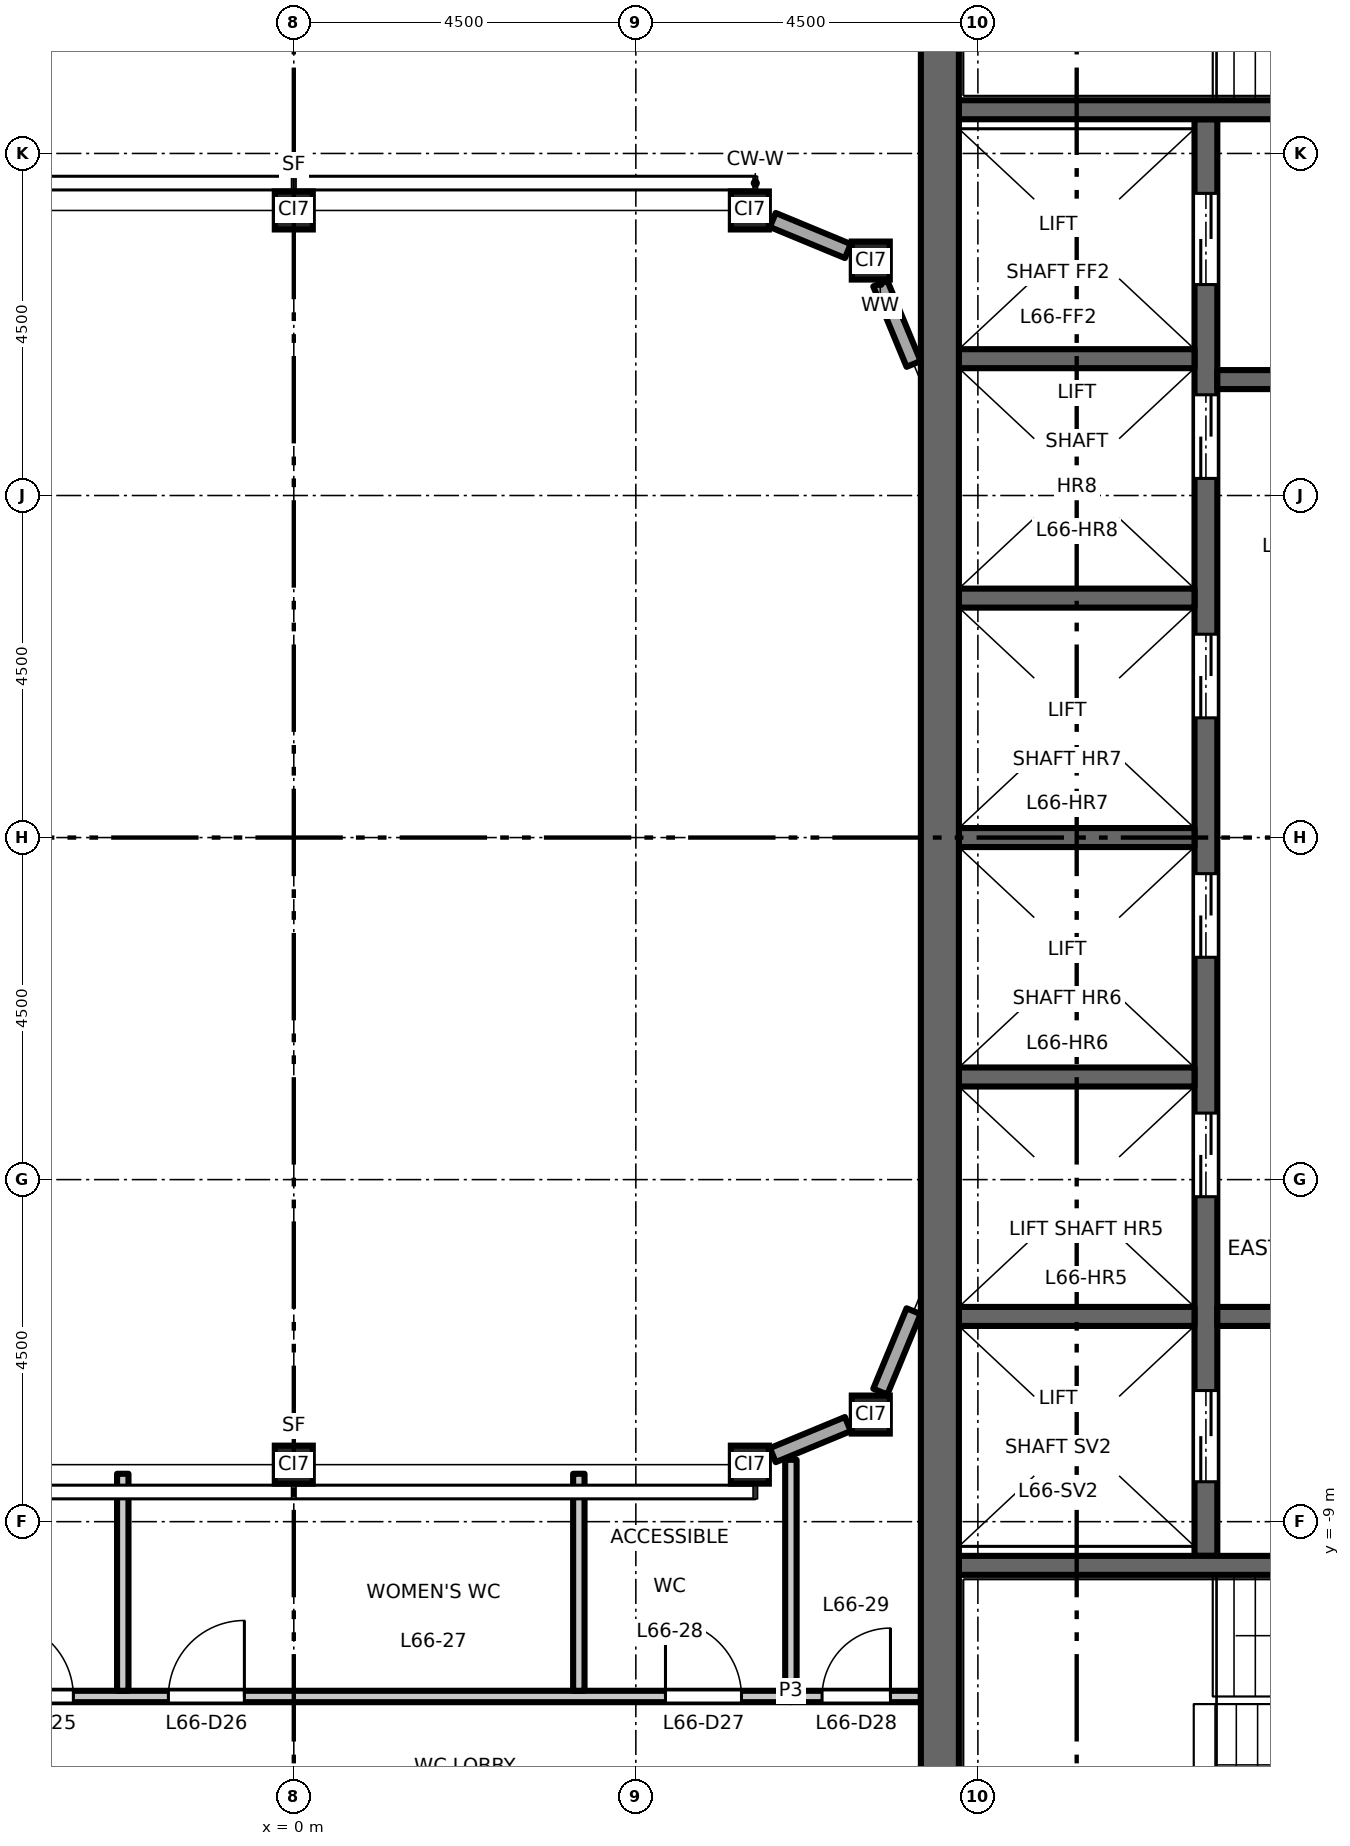
"""IFC4 building model, lengths in metres.
Left out: names, types, materials, properties, quantities, classifications, styles, units other than length and angle.
Written with IfcOpenShell. Run it as: python <this file> out.ifc"""

import sys

from ifc_helpers import new_model, si_unit, direction, frame, frame_2d, origin, origin_2d, place, context, subcontext, project, spatial, rectangle, hollow_rectangle, extrude, element, fill, save


model = new_model("IFC4")
c1 = context("Model", 3, precision=1e-05, world=origin(), true_north=direction((0.0, 1.0)))
c2 = subcontext(c1, "Body", "Model", "MODEL_VIEW")
j1 = project(units=[si_unit("LENGTHUNIT", "METRE"), si_unit("PLANEANGLEUNIT", "RADIAN")], contexts=[c1])
p1 = place(None, origin())
s1 = spatial("IfcSite", under=j1, at=p1, CompositionType="ELEMENT")
p2 = place(p1, origin())
s2 = spatial("IfcBuilding", under=s1, at=p2, CompositionType="ELEMENT")
p3 = place(p2, frame((0.0, 0.0, 307.7)))
s3 = spatial("IfcBuildingStorey", under=s2, at=p3, CompositionType="ELEMENT", Elevation=307.7)
for number, where, z_axis, x_axis in (
    (1, (0.0, -8.25, 0.0), (0.0, 0.0, 1.0), (1.0, 0.0, 0.0)),
    (2, (6.0, -8.25, 0.0), (0.0, 0.0, 1.0), (1.0, 0.0, 0.0)),
    (3, (7.591, -7.591, 0.0), (0.0, 0.0, 1.0), (1.0, 0.0, 0.0)),
    (4, (0.0, 8.25, 0.0), (0.0, 0.0, 1.0), (1.0, 0.0, 0.0)),
    (5, (6.0, 8.25, 0.0), (0.0, 0.0, 1.0), (1.0, 0.0, 0.0)),
    (6, (7.591, 7.591, 0.0), (0.0, 0.0, 1.0), (1.0, 0.0, 0.0)),
):
    element("IfcColumn", number, at=place(p3, frame(where, z_axis=z_axis, x_axis=x_axis)), inside=s3, PredefinedType="COLUMN", context=c2, shape_type="SweptSolid", body=[
        extrude(hollow_rectangle(XDim=0.5, YDim=0.5, WallThickness=0.025, at=origin_2d()), origin(), (0.0, 0.0, 1.0), 4.5),
    ])
p4 = place(p3, frame((12.0, -9.45, 0.0), z_axis=(0.0, 0.0, 1.0), x_axis=(0.0, 1.0, 0.0)))
e7 = element("IfcWall", 7, at=p4, inside=s3, PredefinedType="SHEAR", context=c2, shape_type="SweptSolid", body=[
    extrude(rectangle(XDim=18.9, YDim=0.3, at=frame_2d((9.45, 0.0))), origin(), (0.0, 0.0, 1.0), 4.35),
])
p5 = place(p4, frame((4.725, 0.0, 0.0)))
e8 = element("IfcOpeningElement", 8, at=p5, cuts=e7, PredefinedType="OPENING", context=c2, shape_type="SweptSolid", body=[
    extrude(rectangle(XDim=1.1, YDim=2.1, at=frame_2d((0.55, 1.05))), frame((0.0, 0.16, 0.0), z_axis=(0.0, -1.0, 0.0), x_axis=(1.0, 0.0, 0.0)), (0.0, 0.0, 1.0), 0.32),
])
p6 = place(p4, frame((7.875, 0.0, 0.0)))
e9 = element("IfcOpeningElement", 9, at=p6, cuts=e7, PredefinedType="OPENING", context=c2, shape_type="SweptSolid", body=[
    extrude(rectangle(XDim=1.1, YDim=2.1, at=frame_2d((0.55, 1.05))), frame((0.0, 0.16, 0.0), z_axis=(0.0, -1.0, 0.0), x_axis=(1.0, 0.0, 0.0)), (0.0, 0.0, 1.0), 0.32),
])
p7 = place(p4, frame((11.025, 0.0, 0.0)))
e10 = element("IfcOpeningElement", 10, at=p7, cuts=e7, PredefinedType="OPENING", context=c2, shape_type="SweptSolid", body=[
    extrude(rectangle(XDim=1.1, YDim=2.1, at=frame_2d((0.55, 1.05))), frame((0.0, 0.16, 0.0), z_axis=(0.0, -1.0, 0.0), x_axis=(1.0, 0.0, 0.0)), (0.0, 0.0, 1.0), 0.32),
])
p8 = place(p4, frame((14.175, 0.0, 0.0)))
e11 = element("IfcOpeningElement", 11, at=p8, cuts=e7, PredefinedType="OPENING", context=c2, shape_type="SweptSolid", body=[
    extrude(rectangle(XDim=1.1, YDim=2.1, at=frame_2d((0.55, 1.05))), frame((0.0, 0.16, 0.0), z_axis=(0.0, -1.0, 0.0), x_axis=(1.0, 0.0, 0.0)), (0.0, 0.0, 1.0), 0.32),
])
p9 = place(p4, frame((16.725, 0.0, 0.0)))
e12 = element("IfcOpeningElement", 12, at=p9, cuts=e7, PredefinedType="OPENING", context=c2, shape_type="SweptSolid", body=[
    extrude(rectangle(XDim=1.2, YDim=2.1, at=frame_2d((0.6, 1.05))), frame((0.0, 0.16, 0.0), z_axis=(0.0, -1.0, 0.0), x_axis=(1.0, 0.0, 0.0)), (0.0, 0.0, 1.0), 0.32),
])
p10 = place(p4, frame((0.975, 0.0, 0.0)))
e13 = element("IfcOpeningElement", 13, at=p10, cuts=e7, PredefinedType="OPENING", context=c2, shape_type="SweptSolid", body=[
    extrude(rectangle(XDim=1.2, YDim=2.1, at=frame_2d((0.6, 1.05))), frame((0.0, 0.16, 0.0), z_axis=(0.0, -1.0, 0.0), x_axis=(1.0, 0.0, 0.0)), (0.0, 0.0, 1.0), 0.32),
])
p11 = place(p3, frame((12.15, 6.025, 0.0), z_axis=(0.0, 0.0, 1.0), x_axis=(1.0, 0.0, 0.0)))
e14 = element("IfcWall", 14, at=p11, inside=s3, PredefinedType="SHEAR", context=c2, shape_type="SweptSolid", body=[
    extrude(rectangle(XDim=4.6, YDim=0.25, at=frame_2d((2.3, 0.0))), origin(), (0.0, 0.0, 1.0), 4.35),
])
p12 = place(p11, frame((1.8, 0.0, 0.0)))
e15 = element("IfcOpeningElement", 15, at=p12, cuts=e14, PredefinedType="OPENING", context=c2, shape_type="SweptSolid", body=[
    extrude(rectangle(XDim=1.0, YDim=2.1, at=frame_2d((0.5, 1.05))), frame((0.0, 0.135, 0.0), z_axis=(0.0, -1.0, 0.0), x_axis=(1.0, 0.0, 0.0)), (0.0, 0.0, 1.0), 0.27),
])
p13 = place(p3, frame((12.15, -6.3, 0.0), z_axis=(0.0, 0.0, 1.0), x_axis=(1.0, 0.0, 0.0)))
e16 = element("IfcWall", 16, at=p13, inside=s3, PredefinedType="SHEAR", context=c2, shape_type="SweptSolid", body=[
    extrude(rectangle(XDim=4.6, YDim=0.25, at=frame_2d((2.3, 0.0))), origin(), (0.0, 0.0, 1.0), 4.35),
])
p14 = place(p13, frame((1.8, 0.0, 0.0)))
e17 = element("IfcOpeningElement", 17, at=p14, cuts=e16, PredefinedType="OPENING", context=c2, shape_type="SweptSolid", body=[
    extrude(rectangle(XDim=1.0, YDim=2.1, at=frame_2d((0.5, 1.05))), frame((0.0, 0.135, 0.0), z_axis=(0.0, -1.0, 0.0), x_axis=(1.0, 0.0, 0.0)), (0.0, 0.0, 1.0), 0.27),
])
for number, where, z_axis, x_axis in (
    (18, (8.75, 0.0, 0.0), (0.0, 0.0, 1.0), (1.0, 0.0, 0.0)),
    (19, (8.75, 3.15, 0.0), (0.0, 0.0, 1.0), (1.0, 0.0, 0.0)),
    (20, (8.75, 6.3, 0.0), (0.0, 0.0, 1.0), (1.0, 0.0, 0.0)),
    (21, (8.75, -3.15, 0.0), (0.0, 0.0, 1.0), (1.0, 0.0, 0.0)),
    (22, (8.75, -6.3, 0.0), (0.0, 0.0, 1.0), (1.0, 0.0, 0.0)),
):
    element("IfcWall", number, at=place(p3, frame(where, z_axis=z_axis, x_axis=x_axis)), inside=s3, PredefinedType="SHEAR", context=c2, shape_type="SweptSolid", body=[
        extrude(rectangle(XDim=3.1, YDim=0.25, at=frame_2d((1.55, 0.0))), origin(), (0.0, 0.0, 1.0), 4.35),
    ])
p15 = place(p3, frame((8.75, 9.575, 0.0), z_axis=(0.0, 0.0, 1.0), x_axis=(1.0, 0.0, 0.0)))
e23 = element("IfcWall", 23, at=p15, inside=s3, PredefinedType="SHEAR", context=c2, shape_type="SweptSolid", body=[
    extrude(rectangle(XDim=8.0, YDim=0.25, at=frame_2d((4.0, 0.0))), origin(), (0.0, 0.0, 1.0), 4.35),
])
p16 = place(p15, frame((6.65, 0.0, 0.0)))
e24 = element("IfcOpeningElement", 24, at=p16, cuts=e23, PredefinedType="OPENING", context=c2, shape_type="SweptSolid", body=[
    extrude(rectangle(XDim=1.1, YDim=2.1, at=frame_2d((0.55, 1.05))), frame((0.0, 0.135, 0.0), z_axis=(0.0, -1.0, 0.0), x_axis=(1.0, 0.0, 0.0)), (0.0, 0.0, 1.0), 0.27),
])
p17 = place(p3, frame((8.75, -9.575, 0.0), z_axis=(0.0, 0.0, 1.0), x_axis=(1.0, 0.0, 0.0)))
e25 = element("IfcWall", 25, at=p17, inside=s3, PredefinedType="SHEAR", context=c2, shape_type="SweptSolid", body=[
    extrude(rectangle(XDim=8.0, YDim=0.25, at=frame_2d((4.0, 0.0))), origin(), (0.0, 0.0, 1.0), 4.35),
])
p18 = place(p17, frame((6.65, 0.0, 0.0)))
e26 = element("IfcOpeningElement", 26, at=p18, cuts=e25, PredefinedType="OPENING", context=c2, shape_type="SweptSolid", body=[
    extrude(rectangle(XDim=1.1, YDim=2.1, at=frame_2d((0.55, 1.05))), frame((0.0, 0.135, 0.0), z_axis=(0.0, -1.0, 0.0), x_axis=(1.0, 0.0, 0.0)), (0.0, 0.0, 1.0), 0.27),
])
p19 = place(p3, frame((8.5, -13.0, 0.0), z_axis=(0.0, 0.0, 1.0), x_axis=(0.0, 1.0, 0.0)))
e27 = element("IfcWall", 27, at=p19, inside=s3, PredefinedType="SHEAR", context=c2, shape_type="SweptSolid", body=[
    extrude(rectangle(XDim=26.0, YDim=0.5, at=frame_2d((13.0, 0.0))), origin(), (0.0, 0.0, 1.0), 4.35),
])
p20 = place(p3, frame((6.302, -8.125, 0.0), z_axis=(0.0, 0.0, 1.0), x_axis=(0.923919409248, 0.382587147216, 0.0)))
e28 = element("IfcWall", 28, at=p20, inside=s3, PredefinedType="STANDARD", context=c2, shape_type="SweptSolid", body=[
    extrude(rectangle(XDim=1.069, YDim=0.2, at=frame_2d((0.534, 0.0))), origin(), (0.0, 0.0, 1.0), 4.01),
])
for number, where, z_axis, x_axis in (
    (29, (7.716, -7.289, 0.0), (0.0, 0.0, 1.0), (0.383, 0.924, 0.0)),
    (30, (8.154, 6.231, 0.0), (0.0, 0.0, 1.0), (-0.383, 0.924, 0.0)),
):
    element("IfcWall", number, at=place(p3, frame(where, z_axis=z_axis, x_axis=x_axis)), inside=s3, PredefinedType="STANDARD", context=c2, shape_type="SweptSolid", body=[
        extrude(rectangle(XDim=1.146, YDim=0.2, at=frame_2d((0.573, 0.0))), origin(), (0.0, 0.0, 1.0), 4.01),
    ])
p21 = place(p3, frame((7.289, 7.716, 0.0), z_axis=(0.0, 0.0, 1.0), x_axis=(-0.923919409248, 0.382587147216, 0.0)))
e31 = element("IfcWall", 31, at=p21, inside=s3, PredefinedType="STANDARD", context=c2, shape_type="SweptSolid", body=[
    extrude(rectangle(XDim=1.069, YDim=0.2, at=frame_2d((0.534, 0.0))), origin(), (0.0, 0.0, 1.0), 4.01),
])
p22 = place(p3, frame((-8.25, -11.3, 0.0), z_axis=(0.0, 0.0, 1.0), x_axis=(1.0, 0.0, 0.0)))
e32 = element("IfcWall", 32, at=p22, inside=s3, PredefinedType="PARTITIONING", context=c2, shape_type="SweptSolid", body=[
    extrude(rectangle(XDim=14.79, YDim=0.15, at=frame_2d((7.395, 0.0))), origin(), (0.0, 0.0, 1.0), 4.35),
])
p23 = place(p22, frame((4.35, 0.0, 0.0)))
e33 = element("IfcOpeningElement", 33, at=p23, cuts=e32, PredefinedType="OPENING", context=c2, shape_type="SweptSolid", body=[
    extrude(rectangle(XDim=1.0, YDim=2.1, at=frame_2d((0.5, 1.05))), frame((0.0, 0.085, 0.0), z_axis=(0.0, -1.0, 0.0), x_axis=(1.0, 0.0, 0.0)), (0.0, 0.0, 1.0), 0.17),
])
p24 = place(p22, frame((6.6, 0.0, 0.0)))
e34 = element("IfcOpeningElement", 34, at=p24, cuts=e32, PredefinedType="OPENING", context=c2, shape_type="SweptSolid", body=[
    extrude(rectangle(XDim=1.0, YDim=2.1, at=frame_2d((0.5, 1.05))), frame((0.0, 0.085, 0.0), z_axis=(0.0, -1.0, 0.0), x_axis=(1.0, 0.0, 0.0)), (0.0, 0.0, 1.0), 0.17),
])
p25 = place(p22, frame((13.14, 0.0, 0.0)))
e35 = element("IfcOpeningElement", 35, at=p25, cuts=e32, PredefinedType="OPENING", context=c2, shape_type="SweptSolid", body=[
    extrude(rectangle(XDim=1.0, YDim=2.1, at=frame_2d((0.5, 1.05))), frame((0.0, 0.085, 0.0), z_axis=(0.0, -1.0, 0.0), x_axis=(1.0, 0.0, 0.0)), (0.0, 0.0, 1.0), 0.17),
])
p26 = place(p3, frame((6.54, -11.3, 0.0), z_axis=(0.0, 0.0, 1.0), x_axis=(1.0, 0.0, 0.0)))
e36 = element("IfcWall", 36, at=p26, inside=s3, PredefinedType="PARTITIONING", context=c2, shape_type="SweptSolid", body=[
    extrude(rectangle(XDim=1.71, YDim=0.15, at=frame_2d((0.855, 0.0))), origin(), (0.0, 0.0, 1.0), 4.35),
])
p27 = place(p26, frame((0.41, 0.0, 0.0)))
e37 = element("IfcOpeningElement", 37, at=p27, cuts=e36, PredefinedType="OPENING", context=c2, shape_type="SweptSolid", body=[
    extrude(rectangle(XDim=0.9, YDim=2.1, at=frame_2d((0.45, 1.05))), frame((0.0, 0.085, 0.0), z_axis=(0.0, -1.0, 0.0), x_axis=(1.0, 0.0, 0.0)), (0.0, 0.0, 1.0), 0.17),
])
for number, where, z_axis, x_axis in (
    (38, (-2.25, -11.225, 0.0), (0.0, 0.0, 1.0), (0.0, 1.0, 0.0)),
    (39, (3.75, -11.225, 0.0), (0.0, 0.0, 1.0), (0.0, 1.0, 0.0)),
):
    element("IfcWall", number, at=place(p3, frame(where, z_axis=z_axis, x_axis=x_axis)), inside=s3, PredefinedType="PARTITIONING", context=c2, shape_type="SweptSolid", body=[
        extrude(rectangle(XDim=2.855, YDim=0.15, at=frame_2d((1.427, 0.0))), origin(), (0.0, 0.0, 1.0), 4.35),
    ])
p28 = place(p3, frame((6.54, -11.225, 0.0), z_axis=(0.0, 0.0, 1.0), x_axis=(0.0, 1.0, 0.0)))
e40 = element("IfcWall", 40, at=p28, inside=s3, PredefinedType="PARTITIONING", context=c2, shape_type="SweptSolid", body=[
    extrude(rectangle(XDim=3.039, YDim=0.15, at=frame_2d((1.52, 0.0))), origin(), (0.0, 0.0, 1.0), 4.35),
])
p29 = place(p5, origin())
e41 = element("IfcDoor", 41, at=p29, inside=s3, OperationType="DOUBLE_DOOR_SLIDING", PredefinedType="DOOR", context=c2, shape_type="SweptSolid", body=[
    extrude(rectangle(XDim=1.1, YDim=2.1, at=frame_2d((0.55, 1.05))), frame((0.0, 0.025, 0.0), z_axis=(0.0, -1.0, 0.0), x_axis=(1.0, 0.0, 0.0)), (0.0, 0.0, 1.0), 0.05),
])
fill(e8, e41)
p30 = place(p6, origin())
e42 = element("IfcDoor", 42, at=p30, inside=s3, OperationType="DOUBLE_DOOR_SLIDING", PredefinedType="DOOR", context=c2, shape_type="SweptSolid", body=[
    extrude(rectangle(XDim=1.1, YDim=2.1, at=frame_2d((0.55, 1.05))), frame((0.0, 0.025, 0.0), z_axis=(0.0, -1.0, 0.0), x_axis=(1.0, 0.0, 0.0)), (0.0, 0.0, 1.0), 0.05),
])
fill(e9, e42)
p31 = place(p7, origin())
e43 = element("IfcDoor", 43, at=p31, inside=s3, OperationType="DOUBLE_DOOR_SLIDING", PredefinedType="DOOR", context=c2, shape_type="SweptSolid", body=[
    extrude(rectangle(XDim=1.1, YDim=2.1, at=frame_2d((0.55, 1.05))), frame((0.0, 0.025, 0.0), z_axis=(0.0, -1.0, 0.0), x_axis=(1.0, 0.0, 0.0)), (0.0, 0.0, 1.0), 0.05),
])
fill(e10, e43)
p32 = place(p8, origin())
e44 = element("IfcDoor", 44, at=p32, inside=s3, OperationType="DOUBLE_DOOR_SLIDING", PredefinedType="DOOR", context=c2, shape_type="SweptSolid", body=[
    extrude(rectangle(XDim=1.1, YDim=2.1, at=frame_2d((0.55, 1.05))), frame((0.0, 0.025, 0.0), z_axis=(0.0, -1.0, 0.0), x_axis=(1.0, 0.0, 0.0)), (0.0, 0.0, 1.0), 0.05),
])
fill(e11, e44)
p33 = place(p9, origin())
e45 = element("IfcDoor", 45, at=p33, inside=s3, OperationType="DOUBLE_DOOR_SLIDING", PredefinedType="DOOR", context=c2, shape_type="SweptSolid", body=[
    extrude(rectangle(XDim=1.2, YDim=2.1, at=frame_2d((0.6, 1.05))), frame((0.0, 0.025, 0.0), z_axis=(0.0, -1.0, 0.0), x_axis=(1.0, 0.0, 0.0)), (0.0, 0.0, 1.0), 0.05),
])
fill(e12, e45)
p34 = place(p10, origin())
e46 = element("IfcDoor", 46, at=p34, inside=s3, OperationType="DOUBLE_DOOR_SLIDING", PredefinedType="DOOR", context=c2, shape_type="SweptSolid", body=[
    extrude(rectangle(XDim=1.2, YDim=2.1, at=frame_2d((0.6, 1.05))), frame((0.0, 0.025, 0.0), z_axis=(0.0, -1.0, 0.0), x_axis=(1.0, 0.0, 0.0)), (0.0, 0.0, 1.0), 0.05),
])
fill(e13, e46)
p35 = place(p23, origin())
e47 = element("IfcDoor", 47, at=p35, inside=s3, OperationType="SINGLE_SWING_LEFT", PredefinedType="DOOR", context=c2, shape_type="SweptSolid", body=[
    extrude(rectangle(XDim=1.0, YDim=2.1, at=frame_2d((0.5, 1.05))), frame((0.0, 0.025, 0.0), z_axis=(0.0, -1.0, 0.0), x_axis=(1.0, 0.0, 0.0)), (0.0, 0.0, 1.0), 0.05),
])
fill(e33, e47)
p36 = place(p24, origin())
e48 = element("IfcDoor", 48, at=p36, inside=s3, OperationType="SINGLE_SWING_RIGHT", PredefinedType="DOOR", context=c2, shape_type="SweptSolid", body=[
    extrude(rectangle(XDim=1.0, YDim=2.1, at=frame_2d((0.5, 1.05))), frame((0.0, 0.025, 0.0), z_axis=(0.0, -1.0, 0.0), x_axis=(1.0, 0.0, 0.0)), (0.0, 0.0, 1.0), 0.05),
])
fill(e34, e48)
p37 = place(p25, origin())
e49 = element("IfcDoor", 49, at=p37, inside=s3, OperationType="SINGLE_SWING_LEFT", PredefinedType="DOOR", context=c2, shape_type="SweptSolid", body=[
    extrude(rectangle(XDim=1.0, YDim=2.1, at=frame_2d((0.5, 1.05))), frame((0.0, 0.025, 0.0), z_axis=(0.0, -1.0, 0.0), x_axis=(1.0, 0.0, 0.0)), (0.0, 0.0, 1.0), 0.05),
])
fill(e35, e49)
p38 = place(p27, origin())
e50 = element("IfcDoor", 50, at=p38, inside=s3, OperationType="SINGLE_SWING_RIGHT", PredefinedType="DOOR", context=c2, shape_type="SweptSolid", body=[
    extrude(rectangle(XDim=0.9, YDim=2.1, at=frame_2d((0.45, 1.05))), frame((0.0, 0.025, 0.0), z_axis=(0.0, -1.0, 0.0), x_axis=(1.0, 0.0, 0.0)), (0.0, 0.0, 1.0), 0.05),
])
fill(e37, e50)
save(model, sys.argv[1])
